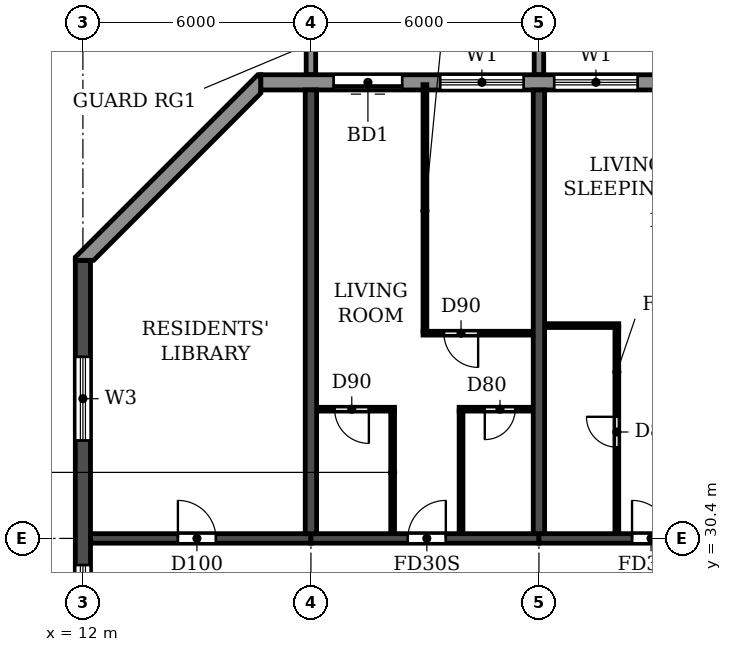
"""IFC4 building model, lengths in metres.
Left out: names, types, materials, properties, quantities, classifications, styles, units other than length and angle.
Written with IfcOpenShell. Run it as: python <this file> out.ifc"""

import sys

from ifc_helpers import new_model, si_unit, direction, frame, frame_2d, origin, place, context, subcontext, project, spatial, polyline, rectangle, outline, extrude, source, transform, mapped, element, fill, save


model = new_model("IFC4")
c1 = context("Model", 3, precision=1e-05, world=origin(), true_north=direction((0.0, 1.0)))
c2 = subcontext(c1, "Body", "Model", "MODEL_VIEW")
j1 = project(units=[si_unit("LENGTHUNIT", "METRE"), si_unit("PLANEANGLEUNIT", "RADIAN")], contexts=[c1])
p1 = place(None, origin())
s1 = spatial("IfcSite", under=j1, at=p1, CompositionType="ELEMENT")
p2 = place(p1, origin())
s2 = spatial("IfcBuilding", under=s1, at=p2, CompositionType="ELEMENT")
p3 = place(p2, frame((0.0, 0.0, 155.4)))
s3 = spatial("IfcBuildingStorey", under=s2, at=p3, CompositionType="ELEMENT", Elevation=155.4)
for number, where, z_axis, x_axis in (
    (1, (18.0, 30.525, 0.0), (0.0, 0.0, 1.0), (0.0, 1.0, 0.0)),
    (2, (24.0, 30.525, 0.0), (0.0, 0.0, 1.0), (0.0, 1.0, 0.0)),
):
    element("IfcWall", number, at=place(p3, frame(where, z_axis=z_axis, x_axis=x_axis)), inside=s3, PredefinedType="SHEAR", context=c2, shape_type="SweptSolid", body=[
        extrude(rectangle(XDim=11.675, YDim=0.3, at=frame_2d((5.837, 0.0))), origin(), (0.0, 0.0, 1.0), 3.0),
    ])
p4 = place(p3, frame((12.0, 4.683, 0.0), z_axis=(0.0, 0.0, 1.0), x_axis=(0.0, 1.0, 0.0)))
e3 = element("IfcWall", 3, at=p4, inside=s3, PredefinedType="SHEAR", context=c2, shape_type="SweptSolid", body=[
    extrude(rectangle(XDim=33.034, YDim=0.4, at=frame_2d((16.517, 0.0))), origin(), (0.0, 0.0, 1.0), 3.0),
])
p5 = place(p4, frame((23.817, 0.0, 0.9)))
e4 = element("IfcOpeningElement", 4, at=p5, cuts=e3, PredefinedType="OPENING", context=c2, shape_type="SweptSolid", body=[
    extrude(rectangle(XDim=1.2, YDim=1.5, at=frame_2d((0.6, 0.75))), frame((0.0, 0.21, 0.0), z_axis=(0.0, -1.0, 0.0), x_axis=(1.0, 0.0, 0.0)), (0.0, 0.0, 1.0), 0.42),
])
p6 = place(p4, frame((8.017, 0.0, 0.9)))
e5 = element("IfcOpeningElement", 5, at=p6, cuts=e3, PredefinedType="OPENING", context=c2, shape_type="SweptSolid", body=[
    extrude(rectangle(XDim=1.2, YDim=1.5, at=frame_2d((0.6, 0.75))), frame((0.0, 0.21, 0.0), z_axis=(0.0, -1.0, 0.0), x_axis=(1.0, 0.0, 0.0)), (0.0, 0.0, 1.0), 0.42),
])
p7 = place(p4, frame((28.293, 0.0, 0.6)))
e6 = element("IfcOpeningElement", 6, at=p7, cuts=e3, PredefinedType="OPENING", context=c2, shape_type="SweptSolid", body=[
    extrude(rectangle(XDim=2.2, YDim=1.8, at=frame_2d((1.1, 0.9))), frame((0.0, 0.21, 0.0), z_axis=(0.0, -1.0, 0.0), x_axis=(1.0, 0.0, 0.0)), (0.0, 0.0, 1.0), 0.42),
])
p8 = place(p4, frame((2.541, 0.0, 0.6)))
e7 = element("IfcOpeningElement", 7, at=p8, cuts=e3, PredefinedType="OPENING", context=c2, shape_type="SweptSolid", body=[
    extrude(rectangle(XDim=2.2, YDim=1.8, at=frame_2d((1.1, 0.9))), frame((0.0, 0.21, 0.0), z_axis=(0.0, -1.0, 0.0), x_axis=(1.0, 0.0, 0.0)), (0.0, 0.0, 1.0), 0.42),
])
p9 = place(p3, frame((12.2, 30.4, 0.0), z_axis=(0.0, 0.0, 1.0), x_axis=(1.0, 0.0, 0.0)))
e8 = element("IfcWall", 8, at=p9, inside=s3, PredefinedType="SHEAR", context=c2, shape_type="SweptSolid", body=[
    extrude(rectangle(XDim=5.8, YDim=0.25, at=frame_2d((2.9, 0.0))), origin(), (0.0, 0.0, 1.0), 2.4),
])
p10 = place(p9, frame((2.3, 0.0, 0.0)))
e9 = element("IfcOpeningElement", 9, at=p10, cuts=e8, PredefinedType="OPENING", context=c2, shape_type="SweptSolid", body=[
    extrude(rectangle(XDim=1.0, YDim=2.1, at=frame_2d((0.5, 1.05))), frame((0.0, 0.135, 0.0), z_axis=(0.0, -1.0, 0.0), x_axis=(1.0, 0.0, 0.0)), (0.0, 0.0, 1.0), 0.27),
])
p11 = place(p3, frame((18.0, 30.4, 0.0), z_axis=(0.0, 0.0, 1.0), x_axis=(1.0, 0.0, 0.0)))
e10 = element("IfcWall", 10, at=p11, inside=s3, PredefinedType="SHEAR", context=c2, shape_type="SweptSolid", body=[
    extrude(rectangle(XDim=6.0, YDim=0.25, at=frame_2d((3.0, 0.0))), origin(), (0.0, 0.0, 1.0), 2.4),
])
p12 = place(p11, frame((2.55, 0.0, 0.0)))
e11 = element("IfcOpeningElement", 11, at=p12, cuts=e10, PredefinedType="OPENING", context=c2, shape_type="SweptSolid", body=[
    extrude(rectangle(XDim=1.0, YDim=2.1, at=frame_2d((0.5, 1.05))), frame((0.0, 0.135, 0.0), z_axis=(0.0, -1.0, 0.0), x_axis=(1.0, 0.0, 0.0)), (0.0, 0.0, 1.0), 0.27),
])
p13 = place(p3, frame((24.0, 30.4, 0.0), z_axis=(0.0, 0.0, 1.0), x_axis=(1.0, 0.0, 0.0)))
e12 = element("IfcWall", 12, at=p13, inside=s3, PredefinedType="SHEAR", context=c2, shape_type="SweptSolid", body=[
    extrude(rectangle(XDim=6.0, YDim=0.25, at=frame_2d((3.0, 0.0))), origin(), (0.0, 0.0, 1.0), 2.4),
])
p14 = place(p13, frame((2.45, 0.0, 0.0)))
e13 = element("IfcOpeningElement", 13, at=p14, cuts=e12, PredefinedType="OPENING", context=c2, shape_type="SweptSolid", body=[
    extrude(rectangle(XDim=1.0, YDim=2.1, at=frame_2d((0.5, 1.05))), frame((0.0, 0.135, 0.0), z_axis=(0.0, -1.0, 0.0), x_axis=(1.0, 0.0, 0.0)), (0.0, 0.0, 1.0), 0.27),
])
p15 = place(p3, frame((85.317, 42.4, 0.0), z_axis=(0.0, 0.0, 1.0), x_axis=(-1.0, 0.0, 0.0)))
e14 = element("IfcWall", 14, at=p15, inside=s3, PredefinedType="STANDARD", context=c2, shape_type="SweptSolid", body=[
    extrude(rectangle(XDim=68.634, YDim=0.4, at=frame_2d((34.317, 0.0))), origin(), (0.0, 0.0, 1.0), 3.0),
])
p16 = place(p15, frame((64.917, 0.0, 0.0)))
e15 = element("IfcOpeningElement", 15, at=p16, cuts=e14, PredefinedType="OPENING", context=c2, shape_type="SweptSolid", body=[
    extrude(rectangle(XDim=1.8, YDim=2.4, at=frame_2d((0.9, 1.2))), frame((0.0, 0.21, 0.0), z_axis=(0.0, -1.0, 0.0), x_axis=(1.0, 0.0, 0.0)), (0.0, 0.0, 1.0), 0.42),
])
p17 = place(p15, frame((61.717, 0.0, 0.9)))
e16 = element("IfcOpeningElement", 16, at=p17, cuts=e14, PredefinedType="OPENING", context=c2, shape_type="SweptSolid", body=[
    extrude(rectangle(XDim=2.2, YDim=1.5, at=frame_2d((1.1, 0.75))), frame((0.0, 0.21, 0.0), z_axis=(0.0, -1.0, 0.0), x_axis=(1.0, 0.0, 0.0)), (0.0, 0.0, 1.0), 0.42),
])
p18 = place(p15, frame((58.717, 0.0, 0.9)))
e17 = element("IfcOpeningElement", 17, at=p18, cuts=e14, PredefinedType="OPENING", context=c2, shape_type="SweptSolid", body=[
    extrude(rectangle(XDim=2.2, YDim=1.5, at=frame_2d((1.1, 0.75))), frame((0.0, 0.21, 0.0), z_axis=(0.0, -1.0, 0.0), x_axis=(1.0, 0.0, 0.0)), (0.0, 0.0, 1.0), 0.42),
])
p19 = place(p15, frame((55.917, 0.0, 0.0)))
e18 = element("IfcOpeningElement", 18, at=p19, cuts=e14, PredefinedType="OPENING", context=c2, shape_type="SweptSolid", body=[
    extrude(rectangle(XDim=1.8, YDim=2.4, at=frame_2d((0.9, 1.2))), frame((0.0, 0.21, 0.0), z_axis=(0.0, -1.0, 0.0), x_axis=(1.0, 0.0, 0.0)), (0.0, 0.0, 1.0), 0.42),
])
p20 = place(p15, frame((52.917, 0.0, 0.0)))
e19 = element("IfcOpeningElement", 19, at=p20, cuts=e14, PredefinedType="OPENING", context=c2, shape_type="SweptSolid", body=[
    extrude(rectangle(XDim=1.8, YDim=2.4, at=frame_2d((0.9, 1.2))), frame((0.0, 0.21, 0.0), z_axis=(0.0, -1.0, 0.0), x_axis=(1.0, 0.0, 0.0)), (0.0, 0.0, 1.0), 0.42),
])
p21 = place(p15, frame((49.717, 0.0, 0.9)))
e20 = element("IfcOpeningElement", 20, at=p21, cuts=e14, PredefinedType="OPENING", context=c2, shape_type="SweptSolid", body=[
    extrude(rectangle(XDim=2.2, YDim=1.5, at=frame_2d((1.1, 0.75))), frame((0.0, 0.21, 0.0), z_axis=(0.0, -1.0, 0.0), x_axis=(1.0, 0.0, 0.0)), (0.0, 0.0, 1.0), 0.42),
])
p22 = place(p15, frame((46.717, 0.0, 0.9)))
e21 = element("IfcOpeningElement", 21, at=p22, cuts=e14, PredefinedType="OPENING", context=c2, shape_type="SweptSolid", body=[
    extrude(rectangle(XDim=2.2, YDim=1.5, at=frame_2d((1.1, 0.75))), frame((0.0, 0.21, 0.0), z_axis=(0.0, -1.0, 0.0), x_axis=(1.0, 0.0, 0.0)), (0.0, 0.0, 1.0), 0.42),
])
p23 = place(p15, frame((43.717, 0.0, 0.9)))
e22 = element("IfcOpeningElement", 22, at=p23, cuts=e14, PredefinedType="OPENING", context=c2, shape_type="SweptSolid", body=[
    extrude(rectangle(XDim=2.2, YDim=1.5, at=frame_2d((1.1, 0.75))), frame((0.0, 0.21, 0.0), z_axis=(0.0, -1.0, 0.0), x_axis=(1.0, 0.0, 0.0)), (0.0, 0.0, 1.0), 0.42),
])
p24 = place(p15, frame((40.917, 0.0, 0.0)))
e23 = element("IfcOpeningElement", 23, at=p24, cuts=e14, PredefinedType="OPENING", context=c2, shape_type="SweptSolid", body=[
    extrude(rectangle(XDim=1.8, YDim=2.4, at=frame_2d((0.9, 1.2))), frame((0.0, 0.21, 0.0), z_axis=(0.0, -1.0, 0.0), x_axis=(1.0, 0.0, 0.0)), (0.0, 0.0, 1.0), 0.42),
])
p25 = place(p15, frame((37.717, 0.0, 0.9)))
e24 = element("IfcOpeningElement", 24, at=p25, cuts=e14, PredefinedType="OPENING", context=c2, shape_type="SweptSolid", body=[
    extrude(rectangle(XDim=2.2, YDim=1.5, at=frame_2d((1.1, 0.75))), frame((0.0, 0.21, 0.0), z_axis=(0.0, -1.0, 0.0), x_axis=(1.0, 0.0, 0.0)), (0.0, 0.0, 1.0), 0.42),
])
p26 = place(p15, frame((34.917, 0.0, 0.0)))
e25 = element("IfcOpeningElement", 25, at=p26, cuts=e14, PredefinedType="OPENING", context=c2, shape_type="SweptSolid", body=[
    extrude(rectangle(XDim=1.8, YDim=2.4, at=frame_2d((0.9, 1.2))), frame((0.0, 0.21, 0.0), z_axis=(0.0, -1.0, 0.0), x_axis=(1.0, 0.0, 0.0)), (0.0, 0.0, 1.0), 0.42),
])
p27 = place(p15, frame((31.717, 0.0, 0.9)))
e26 = element("IfcOpeningElement", 26, at=p27, cuts=e14, PredefinedType="OPENING", context=c2, shape_type="SweptSolid", body=[
    extrude(rectangle(XDim=2.2, YDim=1.5, at=frame_2d((1.1, 0.75))), frame((0.0, 0.21, 0.0), z_axis=(0.0, -1.0, 0.0), x_axis=(1.0, 0.0, 0.0)), (0.0, 0.0, 1.0), 0.42),
])
p28 = place(p15, frame((28.717, 0.0, 0.9)))
e27 = element("IfcOpeningElement", 27, at=p28, cuts=e14, PredefinedType="OPENING", context=c2, shape_type="SweptSolid", body=[
    extrude(rectangle(XDim=2.2, YDim=1.5, at=frame_2d((1.1, 0.75))), frame((0.0, 0.21, 0.0), z_axis=(0.0, -1.0, 0.0), x_axis=(1.0, 0.0, 0.0)), (0.0, 0.0, 1.0), 0.42),
])
p29 = place(p15, frame((25.717, 0.0, 0.9)))
e28 = element("IfcOpeningElement", 28, at=p29, cuts=e14, PredefinedType="OPENING", context=c2, shape_type="SweptSolid", body=[
    extrude(rectangle(XDim=2.2, YDim=1.5, at=frame_2d((1.1, 0.75))), frame((0.0, 0.21, 0.0), z_axis=(0.0, -1.0, 0.0), x_axis=(1.0, 0.0, 0.0)), (0.0, 0.0, 1.0), 0.42),
])
p30 = place(p15, frame((22.717, 0.0, 0.9)))
e29 = element("IfcOpeningElement", 29, at=p30, cuts=e14, PredefinedType="OPENING", context=c2, shape_type="SweptSolid", body=[
    extrude(rectangle(XDim=2.2, YDim=1.5, at=frame_2d((1.1, 0.75))), frame((0.0, 0.21, 0.0), z_axis=(0.0, -1.0, 0.0), x_axis=(1.0, 0.0, 0.0)), (0.0, 0.0, 1.0), 0.42),
])
p31 = place(p15, frame((19.917, 0.0, 0.0)))
e30 = element("IfcOpeningElement", 30, at=p31, cuts=e14, PredefinedType="OPENING", context=c2, shape_type="SweptSolid", body=[
    extrude(rectangle(XDim=1.8, YDim=2.4, at=frame_2d((0.9, 1.2))), frame((0.0, 0.21, 0.0), z_axis=(0.0, -1.0, 0.0), x_axis=(1.0, 0.0, 0.0)), (0.0, 0.0, 1.0), 0.42),
])
p32 = place(p15, frame((16.717, 0.0, 0.9)))
e31 = element("IfcOpeningElement", 31, at=p32, cuts=e14, PredefinedType="OPENING", context=c2, shape_type="SweptSolid", body=[
    extrude(rectangle(XDim=2.2, YDim=1.5, at=frame_2d((1.1, 0.75))), frame((0.0, 0.21, 0.0), z_axis=(0.0, -1.0, 0.0), x_axis=(1.0, 0.0, 0.0)), (0.0, 0.0, 1.0), 0.42),
])
p33 = place(p15, frame((13.717, 0.0, 0.9)))
e32 = element("IfcOpeningElement", 32, at=p33, cuts=e14, PredefinedType="OPENING", context=c2, shape_type="SweptSolid", body=[
    extrude(rectangle(XDim=2.2, YDim=1.5, at=frame_2d((1.1, 0.75))), frame((0.0, 0.21, 0.0), z_axis=(0.0, -1.0, 0.0), x_axis=(1.0, 0.0, 0.0)), (0.0, 0.0, 1.0), 0.42),
])
p34 = place(p15, frame((10.917, 0.0, 0.0)))
e33 = element("IfcOpeningElement", 33, at=p34, cuts=e14, PredefinedType="OPENING", context=c2, shape_type="SweptSolid", body=[
    extrude(rectangle(XDim=1.8, YDim=2.4, at=frame_2d((0.9, 1.2))), frame((0.0, 0.21, 0.0), z_axis=(0.0, -1.0, 0.0), x_axis=(1.0, 0.0, 0.0)), (0.0, 0.0, 1.0), 0.42),
])
p35 = place(p15, frame((7.717, 0.0, 0.9)))
e34 = element("IfcOpeningElement", 34, at=p35, cuts=e14, PredefinedType="OPENING", context=c2, shape_type="SweptSolid", body=[
    extrude(rectangle(XDim=2.2, YDim=1.5, at=frame_2d((1.1, 0.75))), frame((0.0, 0.21, 0.0), z_axis=(0.0, -1.0, 0.0), x_axis=(1.0, 0.0, 0.0)), (0.0, 0.0, 1.0), 0.42),
])
p36 = place(p15, frame((4.717, 0.0, 0.9)))
e35 = element("IfcOpeningElement", 35, at=p36, cuts=e14, PredefinedType="OPENING", context=c2, shape_type="SweptSolid", body=[
    extrude(rectangle(XDim=2.2, YDim=1.5, at=frame_2d((1.1, 0.75))), frame((0.0, 0.21, 0.0), z_axis=(0.0, -1.0, 0.0), x_axis=(1.0, 0.0, 0.0)), (0.0, 0.0, 1.0), 0.42),
])
p37 = place(p15, frame((1.917, 0.0, 0.0)))
e36 = element("IfcOpeningElement", 36, at=p37, cuts=e14, PredefinedType="OPENING", context=c2, shape_type="SweptSolid", body=[
    extrude(rectangle(XDim=1.8, YDim=2.4, at=frame_2d((0.9, 1.2))), frame((0.0, 0.21, 0.0), z_axis=(0.0, -1.0, 0.0), x_axis=(1.0, 0.0, 0.0)), (0.0, 0.0, 1.0), 0.42),
])
p38 = place(p3, origin())
e37 = element("IfcWall", 37, at=p38, inside=s3, PredefinedType="STANDARD", context=c2, shape_type="SweptSolid", body=[
    extrude(outline(polyline([(16.683, 42.6), (16.6, 42.6), (11.8, 37.8), (11.8, 37.717), (12.283, 37.717), (16.683, 42.117), (16.683, 42.6)])), origin(), (0.0, 0.0, 1.0), 3.0),
])
m1 = source(origin(), c2, "Body", "SweptSolid", [
    extrude(outline(polyline([(0.0, 0.0), (0.25, 0.0), (0.25, 3.1), (0.0, 3.1), (0.0, 0.0)])), origin(), (0.0, 0.0, 1.0), 3.1),
])
for number, where in (
    (38, (17.875, 42.6, 0.0)),
    (39, (23.875, 42.6, 0.0)),
):
    element("IfcWall", number, at=place(p3, frame(where)), inside=s3, PredefinedType="STANDARD", context=c2, shape_type="MappedRepresentation", body=[
        mapped(m1, transform((0.0, 0.0, 0.0))),
    ])
p39 = place(p3, frame((18.16, 33.8, 0.0), z_axis=(0.0, 0.0, 1.0), x_axis=(1.0, 0.0, 0.0)))
e40 = element("IfcWall", 40, at=p39, inside=s3, PredefinedType="PARTITIONING", context=c2, shape_type="SweptSolid", body=[
    extrude(rectangle(XDim=2.04, YDim=0.1, at=frame_2d((1.02, 0.0))), origin(), (0.0, 0.0, 1.0), 3.0),
])
p40 = place(p39, frame((0.465, 0.0, 0.0)))
e41 = element("IfcOpeningElement", 41, at=p40, cuts=e40, PredefinedType="OPENING", context=c2, shape_type="SweptSolid", body=[
    extrude(rectangle(XDim=0.9, YDim=2.1, at=frame_2d((0.45, 1.05))), frame((0.0, 0.06, 0.0), z_axis=(0.0, -1.0, 0.0), x_axis=(1.0, 0.0, 0.0)), (0.0, 0.0, 1.0), 0.12),
])
p41 = place(p3, frame((21.9, 33.8, 0.0), z_axis=(0.0, 0.0, 1.0), x_axis=(1.0, 0.0, 0.0)))
e42 = element("IfcWall", 42, at=p41, inside=s3, PredefinedType="PARTITIONING", context=c2, shape_type="SweptSolid", body=[
    extrude(rectangle(XDim=1.94, YDim=0.1, at=frame_2d((0.97, 0.0))), origin(), (0.0, 0.0, 1.0), 3.0),
])
p42 = place(p41, frame((0.675, 0.0, 0.0)))
e43 = element("IfcOpeningElement", 43, at=p42, cuts=e42, PredefinedType="OPENING", context=c2, shape_type="SweptSolid", body=[
    extrude(rectangle(XDim=0.8, YDim=2.1, at=frame_2d((0.4, 1.05))), frame((0.0, 0.06, 0.0), z_axis=(0.0, -1.0, 0.0), x_axis=(1.0, 0.0, 0.0)), (0.0, 0.0, 1.0), 0.12),
])
p43 = place(p3, frame((20.95, 35.8, 0.0), z_axis=(0.0, 0.0, 1.0), x_axis=(1.0, 0.0, 0.0)))
e44 = element("IfcWall", 44, at=p43, inside=s3, PredefinedType="PARTITIONING", context=c2, shape_type="SweptSolid", body=[
    extrude(rectangle(XDim=2.89, YDim=0.1, at=frame_2d((1.445, 0.0))), origin(), (0.0, 0.0, 1.0), 3.0),
])
p44 = place(p43, frame((0.55, 0.0, 0.0)))
e45 = element("IfcOpeningElement", 45, at=p44, cuts=e44, PredefinedType="OPENING", context=c2, shape_type="SweptSolid", body=[
    extrude(rectangle(XDim=0.9, YDim=2.1, at=frame_2d((0.45, 1.05))), frame((0.0, 0.06, 0.0), z_axis=(0.0, -1.0, 0.0), x_axis=(1.0, 0.0, 0.0)), (0.0, 0.0, 1.0), 0.12),
])
p45 = place(p3, frame((24.16, 36.0, 0.0), z_axis=(0.0, 0.0, 1.0), x_axis=(1.0, 0.0, 0.0)))
e46 = element("IfcWall", 46, at=p45, inside=s3, PredefinedType="PARTITIONING", context=c2, shape_type="SweptSolid", body=[
    extrude(rectangle(XDim=1.94, YDim=0.1, at=frame_2d((0.97, 0.0))), origin(), (0.0, 0.0, 1.0), 3.0),
])
p46 = place(p3, frame((20.15, 30.535, 0.0), z_axis=(0.0, 0.0, 1.0), x_axis=(0.0, 1.0, 0.0)))
e47 = element("IfcWall", 47, at=p46, inside=s3, PredefinedType="PARTITIONING", context=c2, shape_type="SweptSolid", body=[
    extrude(rectangle(XDim=3.215, YDim=0.1, at=frame_2d((1.607, 0.0))), origin(), (0.0, 0.0, 1.0), 3.0),
])
p47 = place(p3, frame((21.0, 35.85, 0.0), z_axis=(0.0, 0.0, 1.0), x_axis=(0.0, 1.0, 0.0)))
e48 = element("IfcWall", 48, at=p47, inside=s3, PredefinedType="PARTITIONING", context=c2, shape_type="SweptSolid", body=[
    extrude(rectangle(XDim=6.49, YDim=0.1, at=frame_2d((3.245, 0.0))), origin(), (0.0, 0.0, 1.0), 3.0),
])
p48 = place(p3, frame((21.95, 30.535, 0.0), z_axis=(0.0, 0.0, 1.0), x_axis=(0.0, 1.0, 0.0)))
e49 = element("IfcWall", 49, at=p48, inside=s3, PredefinedType="PARTITIONING", context=c2, shape_type="SweptSolid", body=[
    extrude(rectangle(XDim=3.215, YDim=0.1, at=frame_2d((1.607, 0.0))), origin(), (0.0, 0.0, 1.0), 3.0),
])
p49 = place(p3, frame((26.05, 30.535, 0.0), z_axis=(0.0, 0.0, 1.0), x_axis=(0.0, 1.0, 0.0)))
e50 = element("IfcWall", 50, at=p49, inside=s3, PredefinedType="PARTITIONING", context=c2, shape_type="SweptSolid", body=[
    extrude(rectangle(XDim=5.415, YDim=0.1, at=frame_2d((2.708, 0.0))), origin(), (0.0, 0.0, 1.0), 3.0),
])
p50 = place(p49, frame((2.265, 0.0, 0.0)))
e51 = element("IfcOpeningElement", 51, at=p50, cuts=e50, PredefinedType="OPENING", context=c2, shape_type="SweptSolid", body=[
    extrude(rectangle(XDim=0.8, YDim=2.1, at=frame_2d((0.4, 1.05))), frame((0.0, 0.06, 0.0), z_axis=(0.0, -1.0, 0.0), x_axis=(1.0, 0.0, 0.0)), (0.0, 0.0, 1.0), 0.12),
])
p51 = place(p16, origin())
e52 = element("IfcDoor", 52, at=p51, inside=s3, OperationType="DOUBLE_DOOR_SLIDING", PredefinedType="DOOR", context=c2, shape_type="SweptSolid", body=[
    extrude(rectangle(XDim=1.8, YDim=2.4, at=frame_2d((0.9, 1.2))), frame((0.0, 0.025, 0.0), z_axis=(0.0, -1.0, 0.0), x_axis=(1.0, 0.0, 0.0)), (0.0, 0.0, 1.0), 0.05),
])
fill(e15, e52)
p52 = place(p17, origin())
e53 = element("IfcWindow", 53, at=p52, inside=s3, PartitioningType="DOUBLE_PANEL_HORIZONTAL", PredefinedType="WINDOW", context=c2, shape_type="SweptSolid", body=[
    extrude(rectangle(XDim=2.2, YDim=1.5, at=frame_2d((1.1, 0.75))), frame((0.0, 0.03, 0.0), z_axis=(0.0, -1.0, 0.0), x_axis=(1.0, 0.0, 0.0)), (0.0, 0.0, 1.0), 0.06),
])
fill(e16, e53)
p53 = place(p18, origin())
e54 = element("IfcWindow", 54, at=p53, inside=s3, PartitioningType="DOUBLE_PANEL_HORIZONTAL", PredefinedType="WINDOW", context=c2, shape_type="SweptSolid", body=[
    extrude(rectangle(XDim=2.2, YDim=1.5, at=frame_2d((1.1, 0.75))), frame((0.0, 0.03, 0.0), z_axis=(0.0, -1.0, 0.0), x_axis=(1.0, 0.0, 0.0)), (0.0, 0.0, 1.0), 0.06),
])
fill(e17, e54)
p54 = place(p5, origin())
e55 = element("IfcWindow", 55, at=p54, inside=s3, PartitioningType="SINGLE_PANEL", PredefinedType="WINDOW", context=c2, shape_type="SweptSolid", body=[
    extrude(rectangle(XDim=1.2, YDim=1.5, at=frame_2d((0.6, 0.75))), frame((0.0, 0.03, 0.0), z_axis=(0.0, -1.0, 0.0), x_axis=(1.0, 0.0, 0.0)), (0.0, 0.0, 1.0), 0.06),
])
fill(e4, e55)
p55 = place(p7, origin())
e56 = element("IfcWindow", 56, at=p55, inside=s3, PartitioningType="DOUBLE_PANEL_HORIZONTAL", PredefinedType="WINDOW", context=c2, shape_type="SweptSolid", body=[
    extrude(rectangle(XDim=2.2, YDim=1.8, at=frame_2d((1.1, 0.9))), frame((0.0, 0.03, 0.0), z_axis=(0.0, -1.0, 0.0), x_axis=(1.0, 0.0, 0.0)), (0.0, 0.0, 1.0), 0.06),
])
fill(e6, e56)
p56 = place(p10, origin())
e57 = element("IfcDoor", 57, at=p56, inside=s3, OperationType="SINGLE_SWING_LEFT", PredefinedType="DOOR", context=c2, shape_type="SweptSolid", body=[
    extrude(rectangle(XDim=1.0, YDim=2.1, at=frame_2d((0.5, 1.05))), frame((0.0, 0.025, 0.0), z_axis=(0.0, -1.0, 0.0), x_axis=(1.0, 0.0, 0.0)), (0.0, 0.0, 1.0), 0.05),
])
fill(e9, e57)
p57 = place(p40, frame((0.9, 0.0, 0.0), z_axis=(0.0, 0.0, 1.0), x_axis=(-1.0, 0.0, 0.0)))
e58 = element("IfcDoor", 58, at=p57, inside=s3, OperationType="SINGLE_SWING_LEFT", PredefinedType="DOOR", context=c2, shape_type="SweptSolid", body=[
    extrude(rectangle(XDim=0.9, YDim=2.1, at=frame_2d((0.45, 1.05))), frame((0.0, 0.025, 0.0), z_axis=(0.0, -1.0, 0.0), x_axis=(1.0, 0.0, 0.0)), (0.0, 0.0, 1.0), 0.05),
])
fill(e41, e58)
p58 = place(p12, origin())
e59 = element("IfcDoor", 59, at=p58, inside=s3, OperationType="SINGLE_SWING_RIGHT", PredefinedType="DOOR", context=c2, shape_type="SweptSolid", body=[
    extrude(rectangle(XDim=1.0, YDim=2.1, at=frame_2d((0.5, 1.05))), frame((0.0, 0.025, 0.0), z_axis=(0.0, -1.0, 0.0), x_axis=(1.0, 0.0, 0.0)), (0.0, 0.0, 1.0), 0.05),
])
fill(e11, e59)
p59 = place(p44, frame((0.9, 0.0, 0.0), z_axis=(0.0, 0.0, 1.0), x_axis=(-1.0, 0.0, 0.0)))
e60 = element("IfcDoor", 60, at=p59, inside=s3, OperationType="SINGLE_SWING_LEFT", PredefinedType="DOOR", context=c2, shape_type="SweptSolid", body=[
    extrude(rectangle(XDim=0.9, YDim=2.1, at=frame_2d((0.45, 1.05))), frame((0.0, 0.025, 0.0), z_axis=(0.0, -1.0, 0.0), x_axis=(1.0, 0.0, 0.0)), (0.0, 0.0, 1.0), 0.05),
])
fill(e45, e60)
p60 = place(p42, frame((0.8, 0.0, 0.0), z_axis=(0.0, 0.0, 1.0), x_axis=(-1.0, 0.0, 0.0)))
e61 = element("IfcDoor", 61, at=p60, inside=s3, OperationType="SINGLE_SWING_RIGHT", PredefinedType="DOOR", context=c2, shape_type="SweptSolid", body=[
    extrude(rectangle(XDim=0.8, YDim=2.1, at=frame_2d((0.4, 1.05))), frame((0.0, 0.025, 0.0), z_axis=(0.0, -1.0, 0.0), x_axis=(1.0, 0.0, 0.0)), (0.0, 0.0, 1.0), 0.05),
])
fill(e43, e61)
p61 = place(p50, origin())
e62 = element("IfcDoor", 62, at=p61, inside=s3, OperationType="SINGLE_SWING_RIGHT", PredefinedType="DOOR", context=c2, shape_type="SweptSolid", body=[
    extrude(rectangle(XDim=0.8, YDim=2.1, at=frame_2d((0.4, 1.05))), frame((0.0, 0.025, 0.0), z_axis=(0.0, -1.0, 0.0), x_axis=(1.0, 0.0, 0.0)), (0.0, 0.0, 1.0), 0.05),
])
fill(e51, e62)
p62 = place(p14, origin())
e63 = element("IfcDoor", 63, at=p62, inside=s3, OperationType="SINGLE_SWING_LEFT", PredefinedType="DOOR", context=c2, shape_type="SweptSolid", body=[
    extrude(rectangle(XDim=1.0, YDim=2.1, at=frame_2d((0.5, 1.05))), frame((0.0, 0.025, 0.0), z_axis=(0.0, -1.0, 0.0), x_axis=(1.0, 0.0, 0.0)), (0.0, 0.0, 1.0), 0.05),
])
fill(e13, e63)
save(model, sys.argv[1])
